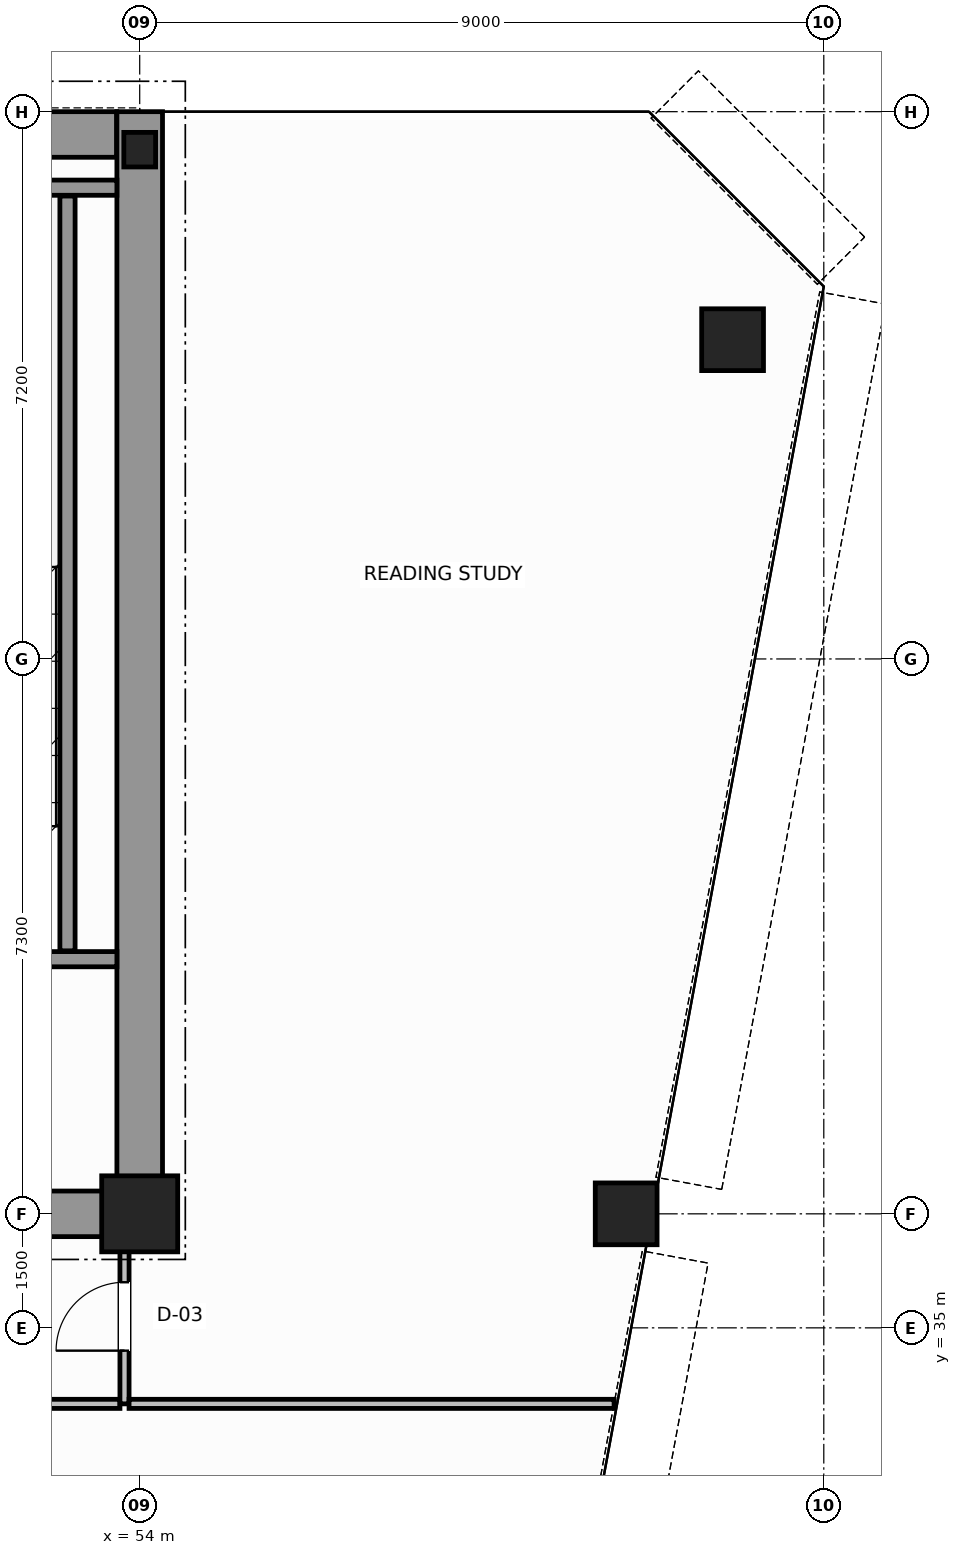
"""IFC4 building model, lengths in metres.
Left out: names, types, materials, properties, quantities, classifications, styles, units other than length and angle.
Written with IfcOpenShell. Run it as: python <this file> out.ifc"""

import sys

from ifc_helpers import new_model, si_unit, direction, frame, frame_2d, origin, origin_2d, place, context, subcontext, project, spatial, rectangle, hollow_circle, i_section, extrude, source, transform, mapped, element, fill, save


model = new_model("IFC4")
c1 = context("Model", 3, precision=1e-05, world=origin(), true_north=direction((0.0, 1.0)))
c2 = subcontext(c1, "Body", "Model", "MODEL_VIEW")
j1 = project(units=[si_unit("LENGTHUNIT", "METRE"), si_unit("PLANEANGLEUNIT", "RADIAN")], contexts=[c1])
p1 = place(None, origin())
s1 = spatial("IfcSite", under=j1, at=p1, CompositionType="ELEMENT")
p2 = place(p1, origin())
s2 = spatial("IfcBuilding", under=s1, at=p2, CompositionType="ELEMENT")
p3 = place(p2, frame((0.0, 0.0, 214.6)))
s3 = spatial("IfcBuildingStorey", under=s2, at=p3, CompositionType="ELEMENT", Elevation=214.6)
m1 = source(origin(), c2, "Body", "SweptSolid", [
    extrude(rectangle(XDim=1.0, YDim=1.0, at=origin_2d()), origin(), (0.0, 0.0, 1.0), 3.8),
])
p4 = place(p3, frame((54.0, 36.5, 0.0), z_axis=(0.0, 0.0, 1.0), x_axis=(1.0, 0.0, 0.0)))
e1 = element("IfcColumn", 1, at=p4, inside=s3, PredefinedType="COLUMN", context=c2, shape_type="MappedRepresentation", body=[
    mapped(m1, transform((0.0, 0.0, 0.0), scale=1.0)),
])
m2 = source(origin(), c2, "Body", "SweptSolid", [
    extrude(i_section(OverallWidth=0.418, OverallDepth=0.455, WebThickness=0.042, FlangeThickness=0.058, FilletRadius=0.015, at=origin_2d()), origin(), (0.0, 0.0, 1.0), 3.8),
])
p5 = place(p3, frame((54.0, 50.5, 0.0), z_axis=(0.0, 0.0, 1.0), x_axis=(1.0, 0.0, 0.0)))
e2 = element("IfcColumn", 2, at=p5, inside=s3, PredefinedType="COLUMN", context=c2, shape_type="MappedRepresentation", body=[
    mapped(m2, transform((0.0, 0.0, 0.0), scale=1.0)),
])
m3 = source(origin(), c2, "Body", "SweptSolid", [
    extrude(hollow_circle(Radius=0.406, WallThickness=0.04, at=origin_2d()), origin(), (0.0, 0.0, 1.0), 3.8),
])
for number, where, z_axis, x_axis in (
    (3, (61.8, 48.0, 0.0), (0.0, 0.0, 1.0), (1.0, 0.0, 0.0)),
    (4, (60.4, 36.5, 0.0), (0.0, 0.0, 1.0), (1.0, 0.0, 0.0)),
):
    element("IfcColumn", number, at=place(p3, frame(where, z_axis=z_axis, x_axis=x_axis)), inside=s3, PredefinedType="COLUMN", context=c2, shape_type="MappedRepresentation", body=[
        mapped(m3, transform((0.0, 0.0, 0.0), scale=1.0)),
    ])
p6 = place(p3, frame((34.002, 50.7, 0.0), z_axis=(0.0, 0.0, 1.0), x_axis=(1.0, 0.0, 0.0)))
e5 = element("IfcWall", 5, at=p6, inside=s3, PredefinedType="SHEAR", context=c2, shape_type="SweptSolid", body=[
    extrude(rectangle(XDim=19.694, YDim=0.6, at=frame_2d((9.847, 0.0))), origin(), (0.0, 0.0, 1.0), 3.8),
])
p7 = place(p3, frame((54.0, 36.5, 0.0), z_axis=(0.0, 0.0, 1.0), x_axis=(0.0, 1.0, 0.0)))
e6 = element("IfcWall", 6, at=p7, inside=s3, PredefinedType="SHEAR", context=c2, shape_type="SweptSolid", body=[
    extrude(rectangle(XDim=14.5, YDim=0.6, at=frame_2d((7.25, 0.0))), origin(), (0.0, 0.0, 1.0), 3.8),
])
p8 = place(p3, frame((49.8, 36.5, 0.0), z_axis=(0.0, 0.0, 1.0), x_axis=(1.0, 0.0, 0.0)))
e7 = element("IfcWall", 7, at=p8, inside=s3, PredefinedType="SHEAR", context=c2, shape_type="SweptSolid", body=[
    extrude(rectangle(XDim=3.88, YDim=0.6, at=frame_2d((1.94, 0.0))), origin(), (0.0, 0.0, 1.0), 2.54),
])
p9 = place(p3, frame((49.4, 39.85, 0.0), z_axis=(0.0, 0.0, 1.0), x_axis=(1.0, 0.0, 0.0)))
e8 = element("IfcWall", 8, at=p9, inside=s3, PredefinedType="SOLIDWALL", context=c2, shape_type="SweptSolid", body=[
    extrude(rectangle(XDim=4.3, YDim=0.2, at=frame_2d((2.15, 0.0))), origin(), (0.0, 0.0, 1.0), 3.8),
])
p10 = place(p9, frame((1.325, 0.0, 0.0)))
e9 = element("IfcOpeningElement", 9, at=p10, cuts=e8, PredefinedType="OPENING", context=c2, shape_type="SweptSolid", body=[
    extrude(rectangle(XDim=1.1, YDim=2.15, at=frame_2d((0.55, 1.075))), frame((0.0, 0.11, 0.0), z_axis=(0.0, -1.0, 0.0), x_axis=(1.0, 0.0, 0.0)), (0.0, 0.0, 1.0), 0.22),
])
p11 = place(p3, frame((49.4, 50.0, 0.0), z_axis=(0.0, 0.0, 1.0), x_axis=(1.0, 0.0, 0.0)))
e10 = element("IfcWall", 10, at=p11, inside=s3, PredefinedType="SOLIDWALL", context=c2, shape_type="SweptSolid", body=[
    extrude(rectangle(XDim=4.3, YDim=0.2, at=frame_2d((2.15, 0.0))), origin(), (0.0, 0.0, 1.0), 3.8),
])
p12 = place(p3, frame((53.05, 39.96, 0.0), z_axis=(0.0, 0.0, 1.0), x_axis=(0.0, 1.0, 0.0)))
e11 = element("IfcWall", 11, at=p12, inside=s3, PredefinedType="SOLIDWALL", context=c2, shape_type="SweptSolid", body=[
    extrude(rectangle(XDim=9.93, YDim=0.2, at=frame_2d((4.965, 0.0))), origin(), (0.0, 0.0, 1.0), 3.8),
])
p13 = place(p3, frame((43.26, 34.0, 0.0), z_axis=(0.0, 0.0, 1.0), x_axis=(1.0, 0.0, 0.0)))
e12 = element("IfcWall", 12, at=p13, inside=s3, PredefinedType="PARTITIONING", context=c2, shape_type="SweptSolid", body=[
    extrude(rectangle(XDim=10.48, YDim=0.12, at=frame_2d((5.24, 0.0))), origin(), (0.0, 0.0, 1.0), 3.54),
])
p14 = place(p3, frame((53.8, 34.0, 0.0), z_axis=(0.0, 0.0, 1.0), x_axis=(0.0, 1.0, 0.0)))
e13 = element("IfcWall", 13, at=p14, inside=s3, PredefinedType="PARTITIONING", context=c2, shape_type="SweptSolid", body=[
    extrude(rectangle(XDim=2.44, YDim=0.12, at=frame_2d((1.22, 0.0))), origin(), (0.0, 0.0, 1.0), 3.54),
])
p15 = place(p14, frame((0.7, 0.0, 0.0)))
e14 = element("IfcOpeningElement", 14, at=p15, cuts=e13, PredefinedType="OPENING", context=c2, shape_type="SweptSolid", body=[
    extrude(rectangle(XDim=0.9, YDim=2.15, at=frame_2d((0.45, 1.075))), frame((0.0, 0.07, 0.0), z_axis=(0.0, -1.0, 0.0), x_axis=(1.0, 0.0, 0.0)), (0.0, 0.0, 1.0), 0.14),
])
p16 = place(p3, frame((53.86, 34.0, 0.0), z_axis=(0.0, 0.0, 1.0), x_axis=(1.0, 0.0, 0.0)))
e15 = element("IfcWall", 15, at=p16, inside=s3, PredefinedType="PARTITIONING", context=c2, shape_type="SweptSolid", body=[
    extrude(rectangle(XDim=6.381, YDim=0.12, at=frame_2d((3.19, 0.0))), origin(), (0.0, 0.0, 1.0), 3.54),
])
m4 = source(origin(), c2, "Body", "SweptSolid", [
    extrude(rectangle(XDim=0.9, YDim=2.15, at=frame_2d((0.45, 1.075))), frame((0.0, 0.025, 0.0), z_axis=(0.0, -1.0, 0.0), x_axis=(1.0, 0.0, 0.0)), (0.0, 0.0, 1.0), 0.05),
])
p17 = place(p15, origin())
e16 = element("IfcDoor", 16, at=p17, inside=s3, OperationType="SINGLE_SWING_RIGHT", PredefinedType="DOOR", context=c2, shape_type="MappedRepresentation", body=[
    mapped(m4, transform((0.0, 0.0, 0.0), scale=1.0)),
])
fill(e14, e16)
save(model, sys.argv[1])
